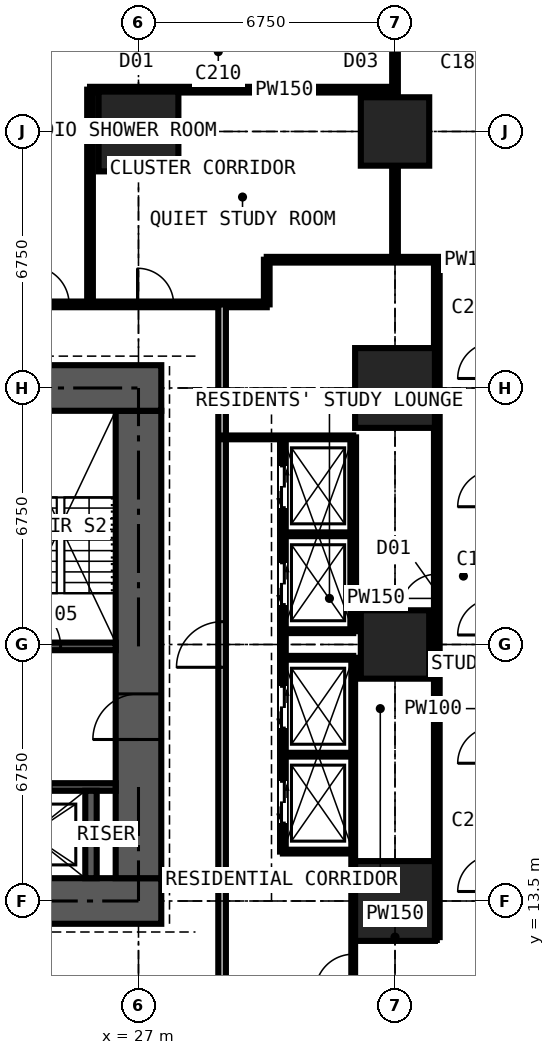
"""IFC4 building model, lengths in metres.
Left out: names, types, materials, properties, quantities, classifications, styles, units other than length and angle.
Written with IfcOpenShell. Run it as: python <this file> out.ifc"""

import sys

from ifc_helpers import new_model, si_unit, direction, frame, frame_2d, origin, origin_2d, place, context, subcontext, project, spatial, rectangle, extrude, element, fill, save


model = new_model("IFC4")
c1 = context("Model", 3, precision=1e-05, world=origin(), true_north=direction((0.0, 1.0)))
c2 = subcontext(c1, "Body", "Model", "MODEL_VIEW")
j1 = project(units=[si_unit("LENGTHUNIT", "METRE"), si_unit("PLANEANGLEUNIT", "RADIAN")], contexts=[c1])
p1 = place(None, origin())
s1 = spatial("IfcSite", under=j1, at=p1, CompositionType="ELEMENT")
p2 = place(p1, origin())
s2 = spatial("IfcBuilding", under=s1, at=p2, CompositionType="ELEMENT")
p3 = place(p2, frame((0.0, 0.0, 72.0)))
s3 = spatial("IfcBuildingStorey", under=s2, at=p3, CompositionType="ELEMENT", Elevation=72.0)
for number, where, z_axis, x_axis in (
    (1, (27.0, 33.75, 0.0), (0.0, 0.0, 1.0), (1.0, 0.0, 0.0)),
    (2, (33.75, 13.5, 0.0), (0.0, 0.0, 1.0), (1.0, 0.0, 0.0)),
):
    element("IfcColumn", number, at=place(p3, frame(where, z_axis=z_axis, x_axis=x_axis)), inside=s3, PredefinedType="COLUMN", context=c2, shape_type="SweptSolid", body=[
        extrude(rectangle(XDim=2.1, YDim=2.1, at=origin_2d()), origin(), (0.0, 0.0, 1.0), 3.6),
    ])
p4 = place(p3, frame((33.75, 20.25, 0.0), z_axis=(0.0, 0.0, 1.0), x_axis=(1.0, 0.0, 0.0)))
e3 = element("IfcColumn", 3, at=p4, inside=s3, PredefinedType="COLUMN", context=c2, shape_type="SweptSolid", body=[
    extrude(rectangle(XDim=1.8, YDim=1.8, at=origin_2d()), origin(), (0.0, 0.0, 1.0), 3.6),
])
p5 = place(p3, frame((33.75, 27.0, 0.0), z_axis=(0.0, 0.0, 1.0), x_axis=(1.0, 0.0, 0.0)))
e4 = element("IfcColumn", 4, at=p5, inside=s3, PredefinedType="COLUMN", context=c2, shape_type="SweptSolid", body=[
    extrude(rectangle(XDim=2.1, YDim=2.1, at=origin_2d()), origin(), (0.0, 0.0, 1.0), 3.6),
])
p6 = place(p3, frame((33.75, 33.75, 0.0), z_axis=(0.0, 0.0, 1.0), x_axis=(1.0, 0.0, 0.0)))
e5 = element("IfcColumn", 5, at=p6, inside=s3, PredefinedType="COLUMN", context=c2, shape_type="SweptSolid", body=[
    extrude(rectangle(XDim=1.8, YDim=1.8, at=origin_2d()), origin(), (0.0, 0.0, 1.0), 3.6),
])
p7 = place(p3, frame((12.9, 13.5, 0.0), z_axis=(0.0, 0.0, 1.0), x_axis=(1.0, 0.0, 0.0)))
e6 = element("IfcWall", 6, at=p7, inside=s3, PredefinedType="SHEAR", context=c2, shape_type="SweptSolid", body=[
    extrude(rectangle(XDim=14.7, YDim=1.2, at=frame_2d((7.35, 0.0))), origin(), (0.0, 0.0, 1.0), 3.6),
])
p8 = place(p3, frame((27.0, 14.1, 0.0), z_axis=(0.0, 0.0, 1.0), x_axis=(0.0, 1.0, 0.0)))
e7 = element("IfcWall", 7, at=p8, inside=s3, PredefinedType="SHEAR", context=c2, shape_type="SweptSolid", body=[
    extrude(rectangle(XDim=12.3, YDim=1.2, at=frame_2d((6.15, 0.0))), origin(), (0.0, 0.0, 1.0), 3.6),
])
p9 = place(p8, frame((3.65, 0.0, 0.0)))
e8 = element("IfcOpeningElement", 8, at=p9, cuts=e7, PredefinedType="OPENING", context=c2, shape_type="SweptSolid", body=[
    extrude(rectangle(XDim=1.2, YDim=2.2, at=frame_2d((0.6, 1.1))), frame((0.0, 0.61, 0.0), z_axis=(0.0, -1.0, 0.0), x_axis=(1.0, 0.0, 0.0)), (0.0, 0.0, 1.0), 1.22),
])
p10 = place(p3, frame((27.6, 27.0, 0.0), z_axis=(0.0, 0.0, 1.0), x_axis=(-1.0, 0.0, 0.0)))
e9 = element("IfcWall", 9, at=p10, inside=s3, PredefinedType="SHEAR", context=c2, shape_type="SweptSolid", body=[
    extrude(rectangle(XDim=14.7, YDim=1.2, at=frame_2d((7.35, 0.0))), origin(), (0.0, 0.0, 1.0), 3.6),
])
p11 = place(p10, frame((5.225, 0.0, 0.0)))
e10 = element("IfcOpeningElement", 10, at=p11, cuts=e9, PredefinedType="OPENING", context=c2, shape_type="SweptSolid", body=[
    extrude(rectangle(XDim=0.9, YDim=2.2, at=frame_2d((0.45, 1.1))), frame((0.0, 0.61, 0.0), z_axis=(0.0, -1.0, 0.0), x_axis=(1.0, 0.0, 0.0)), (0.0, 0.0, 1.0), 1.22),
])
p12 = place(p10, frame((8.2, 0.0, 0.0)))
e11 = element("IfcOpeningElement", 11, at=p12, cuts=e9, PredefinedType="OPENING", context=c2, shape_type="SweptSolid", body=[
    extrude(rectangle(XDim=1.0, YDim=2.2, at=frame_2d((0.5, 1.1))), frame((0.0, 0.61, 0.0), z_axis=(0.0, -1.0, 0.0), x_axis=(1.0, 0.0, 0.0)), (0.0, 0.0, 1.0), 1.22),
])
p13 = place(p3, frame((14.1, 16.5, 0.0), z_axis=(0.0, 0.0, 1.0), x_axis=(1.0, 0.0, 0.0)))
e12 = element("IfcWall", 12, at=p13, inside=s3, PredefinedType="SHEAR", context=c2, shape_type="SweptSolid", body=[
    extrude(rectangle(XDim=12.3, YDim=0.2, at=frame_2d((6.15, 0.0))), origin(), (0.0, 0.0, 1.0), 3.6),
])
p14 = place(p13, frame((0.9, 0.0, 0.0)))
e13 = element("IfcOpeningElement", 13, at=p14, cuts=e12, PredefinedType="OPENING", context=c2, shape_type="SweptSolid", body=[
    extrude(rectangle(XDim=1.1, YDim=2.2, at=frame_2d((0.55, 1.1))), frame((0.0, 0.11, 0.0), z_axis=(0.0, -1.0, 0.0), x_axis=(1.0, 0.0, 0.0)), (0.0, 0.0, 1.0), 0.22),
])
p15 = place(p13, frame((9.5, 0.0, 0.0)))
e14 = element("IfcOpeningElement", 14, at=p15, cuts=e12, PredefinedType="OPENING", context=c2, shape_type="SweptSolid", body=[
    extrude(rectangle(XDim=1.1, YDim=2.2, at=frame_2d((0.55, 1.1))), frame((0.0, 0.11, 0.0), z_axis=(0.0, -1.0, 0.0), x_axis=(1.0, 0.0, 0.0)), (0.0, 0.0, 1.0), 0.22),
])
p16 = place(p3, frame((14.1, 20.2, 0.0), z_axis=(0.0, 0.0, 1.0), x_axis=(1.0, 0.0, 0.0)))
e15 = element("IfcWall", 15, at=p16, inside=s3, PredefinedType="SHEAR", context=c2, shape_type="SweptSolid", body=[
    extrude(rectangle(XDim=12.3, YDim=0.2, at=frame_2d((6.15, 0.0))), origin(), (0.0, 0.0, 1.0), 3.6),
])
p17 = place(p16, frame((0.35, 0.0, 0.0)))
e16 = element("IfcOpeningElement", 16, at=p17, cuts=e15, PredefinedType="OPENING", context=c2, shape_type="SweptSolid", body=[
    extrude(rectangle(XDim=1.1, YDim=2.2, at=frame_2d((0.55, 1.1))), frame((0.0, 0.11, 0.0), z_axis=(0.0, -1.0, 0.0), x_axis=(1.0, 0.0, 0.0)), (0.0, 0.0, 1.0), 0.22),
])
p18 = place(p16, frame((9.75, 0.0, 0.0)))
e17 = element("IfcOpeningElement", 17, at=p18, cuts=e15, PredefinedType="OPENING", context=c2, shape_type="SweptSolid", body=[
    extrude(rectangle(XDim=1.1, YDim=2.2, at=frame_2d((0.55, 1.1))), frame((0.0, 0.11, 0.0), z_axis=(0.0, -1.0, 0.0), x_axis=(1.0, 0.0, 0.0)), (0.0, 0.0, 1.0), 0.22),
])
p19 = place(p3, frame((25.75, 14.1, 0.0), z_axis=(0.0, 0.0, 1.0), x_axis=(0.0, 1.0, 0.0)))
e18 = element("IfcWall", 18, at=p19, inside=s3, PredefinedType="SHEAR", context=c2, shape_type="SweptSolid", body=[
    extrude(rectangle(XDim=2.3, YDim=0.3, at=frame_2d((1.15, 0.0))), origin(), (0.0, 0.0, 1.0), 3.6),
])
p20 = place(p3, frame((11.3, 29.2, 0.0), z_axis=(0.0, 0.0, 1.0), x_axis=(1.0, 0.0, 0.0)))
e19 = element("IfcWall", 19, at=p20, inside=s3, PredefinedType="PARTITIONING", context=c2, shape_type="SweptSolid", body=[
    extrude(rectangle(XDim=19.075, YDim=0.15, at=frame_2d((9.538, 0.0))), origin(), (0.0, 0.0, 1.0), 3.3),
])
p21 = place(p20, frame((12.875, 0.0, 0.0)))
e20 = element("IfcOpeningElement", 20, at=p21, cuts=e19, PredefinedType="OPENING", context=c2, shape_type="SweptSolid", body=[
    extrude(rectangle(XDim=1.0, YDim=2.2, at=frame_2d((0.5, 1.1))), frame((0.0, 0.085, 0.0), z_axis=(0.0, -1.0, 0.0), x_axis=(1.0, 0.0, 0.0)), (0.0, 0.0, 1.0), 0.17),
])
p22 = place(p20, frame((10.438, 0.0, 0.0)))
e21 = element("IfcOpeningElement", 21, at=p22, cuts=e19, PredefinedType="OPENING", context=c2, shape_type="SweptSolid", body=[
    extrude(rectangle(XDim=1.0, YDim=2.2, at=frame_2d((0.5, 1.1))), frame((0.0, 0.085, 0.0), z_axis=(0.0, -1.0, 0.0), x_axis=(1.0, 0.0, 0.0)), (0.0, 0.0, 1.0), 0.17),
])
p23 = place(p20, frame((15.675, 0.0, 0.0)))
e22 = element("IfcOpeningElement", 22, at=p23, cuts=e19, PredefinedType="OPENING", context=c2, shape_type="SweptSolid", body=[
    extrude(rectangle(XDim=0.95, YDim=2.2, at=frame_2d((0.475, 1.1))), frame((0.0, 0.085, 0.0), z_axis=(0.0, -1.0, 0.0), x_axis=(1.0, 0.0, 0.0)), (0.0, 0.0, 1.0), 0.17),
])
p24 = place(p3, frame((25.725, 29.2, 0.0), z_axis=(0.0, 0.0, 1.0), x_axis=(0.0, 1.0, 0.0)))
e23 = element("IfcWall", 23, at=p24, inside=s3, PredefinedType="PARTITIONING", context=c2, shape_type="SweptSolid", body=[
    extrude(rectangle(XDim=5.65, YDim=0.15, at=frame_2d((2.825, 0.0))), origin(), (0.0, 0.0, 1.0), 3.3),
])
p25 = place(p3, frame((25.725, 34.85, 0.0), z_axis=(0.0, 0.0, 1.0), x_axis=(1.0, 0.0, 0.0)))
e24 = element("IfcWall", 24, at=p25, inside=s3, PredefinedType="PARTITIONING", context=c2, shape_type="SweptSolid", body=[
    extrude(rectangle(XDim=8.025, YDim=0.15, at=frame_2d((4.012, 0.0))), origin(), (0.0, 0.0, 1.0), 3.3),
])
p26 = place(p3, frame((29.2, 11.3, 0.0), z_axis=(0.0, 0.0, 1.0), x_axis=(0.0, 1.0, 0.0)))
e25 = element("IfcWall", 25, at=p26, inside=s3, PredefinedType="PARTITIONING", context=c2, shape_type="SweptSolid", body=[
    extrude(rectangle(XDim=17.9, YDim=0.2, at=frame_2d((8.95, 0.0))), origin(), (0.0, 0.0, 1.0), 3.3),
])
p27 = place(p26, frame((8.35, 0.0, 0.0)))
e26 = element("IfcOpeningElement", 26, at=p27, cuts=e25, PredefinedType="OPENING", context=c2, shape_type="SweptSolid", body=[
    extrude(rectangle(XDim=1.2, YDim=2.2, at=frame_2d((0.6, 1.1))), frame((0.0, 0.11, 0.0), z_axis=(0.0, -1.0, 0.0), x_axis=(1.0, 0.0, 0.0)), (0.0, 0.0, 1.0), 0.22),
])
p28 = place(p3, frame((29.2, 25.7, 0.0), z_axis=(0.0, 0.0, 1.0), x_axis=(1.0, 0.0, 0.0)))
e27 = element("IfcWall", 27, at=p28, inside=s3, PredefinedType="SHEAR", context=c2, shape_type="SweptSolid", body=[
    extrude(rectangle(XDim=3.45, YDim=0.1, at=frame_2d((1.725, 0.0))), origin(), (0.0, 0.0, 1.0), 3.3),
])
p29 = place(p3, frame((30.375, 29.2, 0.0), z_axis=(0.0, 0.0, 1.0), x_axis=(0.0, 1.0, 0.0)))
e28 = element("IfcWall", 28, at=p29, inside=s3, PredefinedType="PARTITIONING", context=c2, shape_type="SweptSolid", body=[
    extrude(rectangle(XDim=1.175, YDim=0.15, at=frame_2d((0.587, 0.0))), origin(), (0.0, 0.0, 1.0), 3.3),
])
p30 = place(p3, frame((30.375, 30.375, 0.0), z_axis=(0.0, 0.0, 1.0), x_axis=(1.0, 0.0, 0.0)))
e29 = element("IfcWall", 29, at=p30, inside=s3, PredefinedType="PARTITIONING", context=c2, shape_type="SweptSolid", body=[
    extrude(rectangle(XDim=10.859, YDim=0.15, at=frame_2d((5.429, 0.0))), origin(), (0.0, 0.0, 1.0), 3.3),
])
p31 = place(p3, frame((30.8, 14.8, 0.0), z_axis=(0.0, 0.0, 1.0), x_axis=(0.0, 1.0, 0.0)))
e30 = element("IfcWall", 30, at=p31, inside=s3, PredefinedType="PARTITIONING", context=c2, shape_type="SweptSolid", body=[
    extrude(rectangle(XDim=10.9, YDim=0.15, at=frame_2d((5.45, 0.0))), origin(), (0.0, 0.0, 1.0), 3.3),
])
p32 = place(p31, frame((0.75, 0.0, 0.0)))
e31 = element("IfcOpeningElement", 31, at=p32, cuts=e30, PredefinedType="OPENING", context=c2, shape_type="SweptSolid", body=[
    extrude(rectangle(XDim=1.1, YDim=2.2, at=frame_2d((0.55, 1.1))), frame((0.0, 0.085, 0.0), z_axis=(0.0, -1.0, 0.0), x_axis=(1.0, 0.0, 0.0)), (0.0, 0.0, 1.0), 0.17),
])
p33 = place(p31, frame((3.25, 0.0, 0.0)))
e32 = element("IfcOpeningElement", 32, at=p33, cuts=e30, PredefinedType="OPENING", context=c2, shape_type="SweptSolid", body=[
    extrude(rectangle(XDim=1.1, YDim=2.2, at=frame_2d((0.55, 1.1))), frame((0.0, 0.085, 0.0), z_axis=(0.0, -1.0, 0.0), x_axis=(1.0, 0.0, 0.0)), (0.0, 0.0, 1.0), 0.17),
])
p34 = place(p31, frame((6.5, 0.0, 0.0)))
e33 = element("IfcOpeningElement", 33, at=p34, cuts=e30, PredefinedType="OPENING", context=c2, shape_type="SweptSolid", body=[
    extrude(rectangle(XDim=1.1, YDim=2.2, at=frame_2d((0.55, 1.1))), frame((0.0, 0.085, 0.0), z_axis=(0.0, -1.0, 0.0), x_axis=(1.0, 0.0, 0.0)), (0.0, 0.0, 1.0), 0.17),
])
p35 = place(p31, frame((9.05, 0.0, 0.0)))
e34 = element("IfcOpeningElement", 34, at=p35, cuts=e30, PredefinedType="OPENING", context=c2, shape_type="SweptSolid", body=[
    extrude(rectangle(XDim=1.1, YDim=2.2, at=frame_2d((0.55, 1.1))), frame((0.0, 0.085, 0.0), z_axis=(0.0, -1.0, 0.0), x_axis=(1.0, 0.0, 0.0)), (0.0, 0.0, 1.0), 0.17),
])
for number, where, z_axis, x_axis in (
    (35, (30.8, 14.8, 0.0), (0.0, 0.0, 1.0), (1.0, 0.0, 0.0)),
    (36, (30.8, 17.35, 0.0), (0.0, 0.0, 1.0), (1.0, 0.0, 0.0)),
    (37, (30.8, 19.9, 0.0), (0.0, 0.0, 1.0), (1.0, 0.0, 0.0)),
    (38, (30.8, 20.6, 0.0), (0.0, 0.0, 1.0), (1.0, 0.0, 0.0)),
    (39, (30.8, 23.15, 0.0), (0.0, 0.0, 1.0), (1.0, 0.0, 0.0)),
):
    element("IfcWall", number, at=place(p3, frame(where, z_axis=z_axis, x_axis=x_axis)), inside=s3, PredefinedType="SHEAR", context=c2, shape_type="SweptSolid", body=[
        extrude(rectangle(XDim=1.85, YDim=0.1, at=frame_2d((0.925, 0.0))), origin(), (0.0, 0.0, 1.0), 3.3),
    ])
p36 = place(p3, frame((32.65, 10.6, 0.0), z_axis=(0.0, 0.0, 1.0), x_axis=(0.0, 1.0, 0.0)))
e40 = element("IfcWall", 40, at=p36, inside=s3, PredefinedType="SHEAR", context=c2, shape_type="SweptSolid", body=[
    extrude(rectangle(XDim=9.3, YDim=0.1, at=frame_2d((4.65, 0.0))), origin(), (0.0, 0.0, 1.0), 3.3),
])
p37 = place(p36, frame((0.5, 0.0, 0.0)))
e41 = element("IfcOpeningElement", 41, at=p37, cuts=e40, PredefinedType="OPENING", context=c2, shape_type="SweptSolid", body=[
    extrude(rectangle(XDim=1.0, YDim=2.2, at=frame_2d((0.5, 1.1))), frame((0.0, 0.06, 0.0), z_axis=(0.0, -1.0, 0.0), x_axis=(1.0, 0.0, 0.0)), (0.0, 0.0, 1.0), 0.12),
])
p38 = place(p3, frame((32.65, 12.55, 0.0), z_axis=(0.0, 0.0, 1.0), x_axis=(1.0, 0.0, 0.0)))
e42 = element("IfcWall", 42, at=p38, inside=s3, PredefinedType="PARTITIONING", context=c2, shape_type="SweptSolid", body=[
    extrude(rectangle(XDim=2.2, YDim=0.15, at=frame_2d((1.1, 0.0))), origin(), (0.0, 0.0, 1.0), 3.3),
])
p39 = place(p3, frame((32.65, 20.6, 0.0), z_axis=(0.0, 0.0, 1.0), x_axis=(0.0, 1.0, 0.0)))
e43 = element("IfcWall", 43, at=p39, inside=s3, PredefinedType="PARTITIONING", context=c2, shape_type="SweptSolid", body=[
    extrude(rectangle(XDim=5.1, YDim=0.15, at=frame_2d((2.55, 0.0))), origin(), (0.0, 0.0, 1.0), 3.3),
])
p40 = place(p3, frame((33.75, 30.375, 0.0), z_axis=(0.0, 0.0, 1.0), x_axis=(0.0, 1.0, 0.0)))
e44 = element("IfcWall", 44, at=p40, inside=s3, PredefinedType="PARTITIONING", context=c2, shape_type="SweptSolid", body=[
    extrude(rectangle(XDim=5.975, YDim=0.15, at=frame_2d((2.988, 0.0))), origin(), (0.0, 0.0, 1.0), 2.802),
])
p41 = place(p3, frame((34.85, 12.55, 0.0), z_axis=(0.0, 0.0, 1.0), x_axis=(0.0, 1.0, 0.0)))
e45 = element("IfcWall", 45, at=p41, inside=s3, PredefinedType="PARTITIONING", context=c2, shape_type="SweptSolid", body=[
    extrude(rectangle(XDim=17.825, YDim=0.15, at=frame_2d((8.913, 0.0))), origin(), (0.0, 0.0, 1.0), 3.3),
])
p42 = place(p41, frame((8.6, 0.0, 0.0)))
e46 = element("IfcOpeningElement", 46, at=p42, cuts=e45, PredefinedType="OPENING", context=c2, shape_type="SweptSolid", body=[
    extrude(rectangle(XDim=0.95, YDim=2.2, at=frame_2d((0.475, 1.1))), frame((0.0, 0.085, 0.0), z_axis=(0.0, -1.0, 0.0), x_axis=(1.0, 0.0, 0.0)), (0.0, 0.0, 1.0), 0.17),
])
p43 = place(p9, origin())
e47 = element("IfcDoor", 47, at=p43, inside=s3, OperationType="DOUBLE_DOOR_SINGLE_SWING", PredefinedType="DOOR", context=c2, shape_type="SweptSolid", body=[
    extrude(rectangle(XDim=1.2, YDim=2.2, at=frame_2d((0.6, 1.1))), frame((0.0, 0.025, 0.0), z_axis=(0.0, -1.0, 0.0), x_axis=(1.0, 0.0, 0.0)), (0.0, 0.0, 1.0), 0.05),
])
fill(e8, e47)
p44 = place(p18, origin())
e48 = element("IfcDoor", 48, at=p44, inside=s3, OperationType="SINGLE_SWING_LEFT", PredefinedType="DOOR", context=c2, shape_type="SweptSolid", body=[
    extrude(rectangle(XDim=1.1, YDim=2.2, at=frame_2d((0.55, 1.1))), frame((0.0, 0.025, 0.0), z_axis=(0.0, -1.0, 0.0), x_axis=(1.0, 0.0, 0.0)), (0.0, 0.0, 1.0), 0.05),
])
fill(e17, e48)
p45 = place(p37, origin())
e49 = element("IfcDoor", 49, at=p45, inside=s3, OperationType="SINGLE_SWING_LEFT", PredefinedType="DOOR", context=c2, shape_type="SweptSolid", body=[
    extrude(rectangle(XDim=1.0, YDim=2.2, at=frame_2d((0.5, 1.1))), frame((0.0, 0.025, 0.0), z_axis=(0.0, -1.0, 0.0), x_axis=(1.0, 0.0, 0.0)), (0.0, 0.0, 1.0), 0.05),
])
fill(e41, e49)
p46 = place(p42, origin())
e50 = element("IfcDoor", 50, at=p46, inside=s3, OperationType="SINGLE_SWING_LEFT", PredefinedType="DOOR", context=c2, shape_type="SweptSolid", body=[
    extrude(rectangle(XDim=0.95, YDim=2.2, at=frame_2d((0.475, 1.1))), frame((0.0, 0.025, 0.0), z_axis=(0.0, -1.0, 0.0), x_axis=(1.0, 0.0, 0.0)), (0.0, 0.0, 1.0), 0.05),
])
fill(e46, e50)
p47 = place(p21, origin())
e51 = element("IfcDoor", 51, at=p47, inside=s3, OperationType="SINGLE_SWING_LEFT", PredefinedType="DOOR", context=c2, shape_type="SweptSolid", body=[
    extrude(rectangle(XDim=1.0, YDim=2.2, at=frame_2d((0.5, 1.1))), frame((0.0, 0.025, 0.0), z_axis=(0.0, -1.0, 0.0), x_axis=(1.0, 0.0, 0.0)), (0.0, 0.0, 1.0), 0.05),
])
fill(e20, e51)
p48 = place(p23, origin())
e52 = element("IfcDoor", 52, at=p48, inside=s3, OperationType="SINGLE_SWING_LEFT", PredefinedType="DOOR", context=c2, shape_type="SweptSolid", body=[
    extrude(rectangle(XDim=0.95, YDim=2.2, at=frame_2d((0.475, 1.1))), frame((0.0, 0.025, 0.0), z_axis=(0.0, -1.0, 0.0), x_axis=(1.0, 0.0, 0.0)), (0.0, 0.0, 1.0), 0.05),
])
fill(e22, e52)
p49 = place(p32, origin())
e53 = element("IfcDoor", 53, at=p49, inside=s3, OperationType="DOUBLE_DOOR_SLIDING", PredefinedType="DOOR", context=c2, shape_type="SweptSolid", body=[
    extrude(rectangle(XDim=1.1, YDim=2.2, at=frame_2d((0.55, 1.1))), frame((0.0, 0.025, 0.0), z_axis=(0.0, -1.0, 0.0), x_axis=(1.0, 0.0, 0.0)), (0.0, 0.0, 1.0), 0.05),
])
fill(e31, e53)
p50 = place(p33, origin())
e54 = element("IfcDoor", 54, at=p50, inside=s3, OperationType="DOUBLE_DOOR_SLIDING", PredefinedType="DOOR", context=c2, shape_type="SweptSolid", body=[
    extrude(rectangle(XDim=1.1, YDim=2.2, at=frame_2d((0.55, 1.1))), frame((0.0, 0.025, 0.0), z_axis=(0.0, -1.0, 0.0), x_axis=(1.0, 0.0, 0.0)), (0.0, 0.0, 1.0), 0.05),
])
fill(e32, e54)
p51 = place(p34, origin())
e55 = element("IfcDoor", 55, at=p51, inside=s3, OperationType="DOUBLE_DOOR_SLIDING", PredefinedType="DOOR", context=c2, shape_type="SweptSolid", body=[
    extrude(rectangle(XDim=1.1, YDim=2.2, at=frame_2d((0.55, 1.1))), frame((0.0, 0.025, 0.0), z_axis=(0.0, -1.0, 0.0), x_axis=(1.0, 0.0, 0.0)), (0.0, 0.0, 1.0), 0.05),
])
fill(e33, e55)
p52 = place(p35, origin())
e56 = element("IfcDoor", 56, at=p52, inside=s3, OperationType="DOUBLE_DOOR_SLIDING", PredefinedType="DOOR", context=c2, shape_type="SweptSolid", body=[
    extrude(rectangle(XDim=1.1, YDim=2.2, at=frame_2d((0.55, 1.1))), frame((0.0, 0.025, 0.0), z_axis=(0.0, -1.0, 0.0), x_axis=(1.0, 0.0, 0.0)), (0.0, 0.0, 1.0), 0.05),
])
fill(e34, e56)
p53 = place(p27, origin())
e57 = element("IfcDoor", 57, at=p53, inside=s3, OperationType="DOUBLE_DOOR_SINGLE_SWING", PredefinedType="DOOR", context=c2, shape_type="SweptSolid", body=[
    extrude(rectangle(XDim=1.2, YDim=2.2, at=frame_2d((0.6, 1.1))), frame((0.0, 0.025, 0.0), z_axis=(0.0, -1.0, 0.0), x_axis=(1.0, 0.0, 0.0)), (0.0, 0.0, 1.0), 0.05),
])
fill(e26, e57)
save(model, sys.argv[1])
